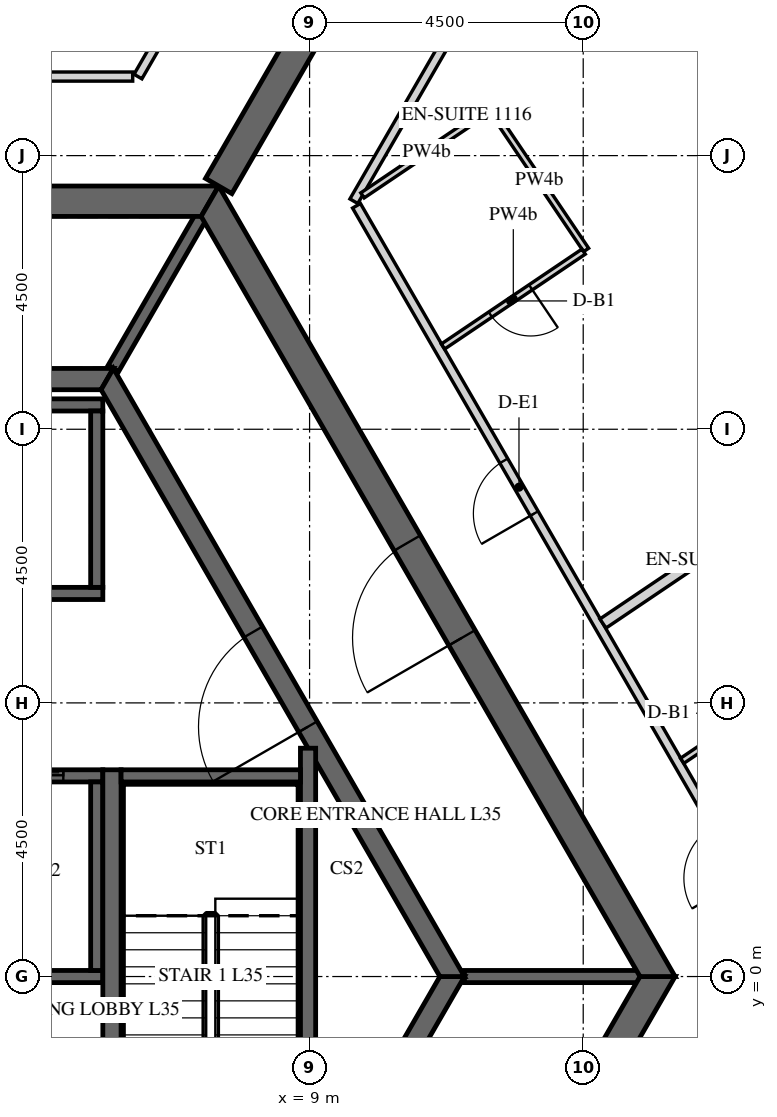
"""IFC4 building model, lengths in metres.
Left out: names, types, materials, properties, quantities, classifications, styles, units other than length and angle.
Written with IfcOpenShell. Run it as: python <this file> out.ifc"""

import sys

from ifc_helpers import new_model, si_unit, direction, frame, frame_2d, origin, place, context, subcontext, project, spatial, polyline, rectangle, outline, extrude, element, fill, save


model = new_model("IFC4")
c1 = context("Model", 3, precision=1e-05, world=origin(), true_north=direction((0.0, 1.0)))
c2 = subcontext(c1, "Body", "Model", "MODEL_VIEW")
j1 = project(units=[si_unit("LENGTHUNIT", "METRE"), si_unit("PLANEANGLEUNIT", "RADIAN")], contexts=[c1])
p1 = place(None, origin())
s1 = spatial("IfcSite", under=j1, at=p1, CompositionType="ELEMENT")
p2 = place(p1, origin())
s2 = spatial("IfcBuilding", under=s1, at=p2, CompositionType="ELEMENT")
p3 = place(p2, frame((0.0, 0.0, 152.7)))
s3 = spatial("IfcBuildingStorey", under=s2, at=p3, CompositionType="ELEMENT", Elevation=152.7)
p4 = place(p3, frame((7.361, -12.75, 0.0), z_axis=(0.0, 0.0, 1.0), x_axis=(0.50000571537, 0.866022103989, 0.0)))
e1 = element("IfcWall", 1, at=p4, inside=s3, PredefinedType="SHEAR", context=c2, shape_type="SweptSolid", body=[
    extrude(outline(polyline([(-0.144, -0.25), (14.867, -0.25), (14.578, 0.25), (0.144, 0.25), (-0.144, -0.25)])), origin(), (0.0, 0.0, 1.0), 3.75),
])
p5 = place(p4, frame((6.49, 0.0, 0.0)))
e2 = element("IfcOpeningElement", 2, at=p5, cuts=e1, PredefinedType="OPENING", context=c2, shape_type="SweptSolid", body=[
    extrude(rectangle(XDim=1.8, YDim=2.4, at=frame_2d((0.9, 1.2))), frame((0.0, 0.26, 0.0), z_axis=(0.0, -1.0, 0.0), x_axis=(1.0, 0.0, 0.0)), (0.0, 0.0, 1.0), 0.52),
])
p6 = place(p3, frame((14.722, 0.0, 0.0), z_axis=(0.0, 0.0, 1.0), x_axis=(-0.50000571537, 0.866022103989, 0.0)))
e3 = element("IfcWall", 3, at=p6, inside=s3, PredefinedType="SHEAR", context=c2, shape_type="SweptSolid", body=[
    extrude(outline(polyline([(-0.144, -0.25), (14.867, -0.25), (14.578, 0.25), (0.144, 0.25), (-0.144, -0.25)])), origin(), (0.0, 0.0, 1.0), 3.75),
])
p7 = place(p6, frame((6.432, 0.0, 0.0)))
e4 = element("IfcOpeningElement", 4, at=p7, cuts=e3, PredefinedType="OPENING", context=c2, shape_type="SweptSolid", body=[
    extrude(rectangle(XDim=1.8, YDim=2.4, at=frame_2d((0.9, 1.2))), frame((0.0, 0.26, 0.0), z_axis=(0.0, -1.0, 0.0), x_axis=(1.0, 0.0, 0.0)), (0.0, 0.0, 1.0), 0.52),
])
p8 = place(p3, frame((7.361, 12.75, 0.0), z_axis=(0.0, 0.0, 1.0), x_axis=(-1.0, 0.0, 0.0)))
e5 = element("IfcWall", 5, at=p8, inside=s3, PredefinedType="SHEAR", context=c2, shape_type="SweptSolid", body=[
    extrude(outline(polyline([(-0.144, -0.25), (14.866, -0.25), (14.578, 0.25), (0.144, 0.25), (-0.144, -0.25)])), origin(), (0.0, 0.0, 1.0), 3.75),
])
p9 = place(p8, frame((6.761, 0.0, 0.0)))
e6 = element("IfcOpeningElement", 6, at=p9, cuts=e5, PredefinedType="OPENING", context=c2, shape_type="SweptSolid", body=[
    extrude(rectangle(XDim=1.2, YDim=2.4, at=frame_2d((0.6, 1.2))), frame((0.0, 0.26, 0.0), z_axis=(0.0, -1.0, 0.0), x_axis=(1.0, 0.0, 0.0)), (0.0, 0.0, 1.0), 0.52),
])
p10 = place(p3, frame((7.506, 13.0, 0.0), z_axis=(0.0, 0.0, 1.0), x_axis=(0.499988271576, 0.866032175087, 0.0)))
e7 = element("IfcWall", 7, at=p10, inside=s3, PredefinedType="SHEAR", context=c2, shape_type="SweptSolid", body=[
    extrude(rectangle(XDim=15.424, YDim=0.5, at=frame_2d((7.712, 0.0))), origin(), (0.0, 0.0, 1.0), 3.75),
])
p11 = place(p10, frame((6.812, 0.0, 0.0)))
e8 = element("IfcOpeningElement", 8, at=p11, cuts=e7, PredefinedType="OPENING", context=c2, shape_type="SweptSolid", body=[
    extrude(rectangle(XDim=1.8, YDim=2.4, at=frame_2d((0.9, 1.2))), frame((0.0, 0.26, 0.0), z_axis=(0.0, -1.0, 0.0), x_axis=(1.0, 0.0, 0.0)), (0.0, 0.0, 1.0), 0.52),
])
p12 = place(p3, frame((5.673, -9.825, 0.0), z_axis=(0.0, 0.0, 1.0), x_axis=(0.499995046907, 0.866028263435, 0.0)))
e9 = element("IfcWall", 9, at=p12, inside=s3, PredefinedType="SHEAR", context=c2, shape_type="SweptSolid", body=[
    extrude(outline(polyline([(-0.101, -0.175), (11.446, -0.175), (11.244, 0.175), (0.101, 0.175), (-0.101, -0.175)])), origin(), (0.0, 0.0, 1.0), 3.75),
])
p13 = place(p12, frame((4.801, 0.0, 0.0)))
e10 = element("IfcOpeningElement", 10, at=p13, cuts=e9, PredefinedType="OPENING", context=c2, shape_type="SweptSolid", body=[
    extrude(rectangle(XDim=1.8, YDim=2.4, at=frame_2d((0.9, 1.2))), frame((0.0, 0.185, 0.0), z_axis=(0.0, -1.0, 0.0), x_axis=(1.0, 0.0, 0.0)), (0.0, 0.0, 1.0), 0.37),
])
p14 = place(p3, frame((11.345, 0.0, 0.0), z_axis=(0.0, 0.0, 1.0), x_axis=(-0.499995046907, 0.866028263435, 0.0)))
e11 = element("IfcWall", 11, at=p14, inside=s3, PredefinedType="SHEAR", context=c2, shape_type="SweptSolid", body=[
    extrude(outline(polyline([(-0.101, -0.175), (11.446, -0.175), (11.244, 0.175), (0.101, 0.175), (-0.101, -0.175)])), origin(), (0.0, 0.0, 1.0), 3.75),
])
p15 = place(p14, frame((4.744, 0.0, 0.0)))
e12 = element("IfcOpeningElement", 12, at=p15, cuts=e11, PredefinedType="OPENING", context=c2, shape_type="SweptSolid", body=[
    extrude(rectangle(XDim=1.8, YDim=2.4, at=frame_2d((0.9, 1.2))), frame((0.0, 0.185, 0.0), z_axis=(0.0, -1.0, 0.0), x_axis=(1.0, 0.0, 0.0)), (0.0, 0.0, 1.0), 0.37),
])
p16 = place(p3, frame((5.673, 9.825, 0.0), z_axis=(0.0, 0.0, 1.0), x_axis=(-1.0, 0.0, 0.0)))
e13 = element("IfcWall", 13, at=p16, inside=s3, PredefinedType="SHEAR", context=c2, shape_type="SweptSolid", body=[
    extrude(outline(polyline([(-0.101, -0.175), (11.446, -0.175), (11.244, 0.175), (0.101, 0.175), (-0.101, -0.175)])), origin(), (0.0, 0.0, 1.0), 3.75),
])
p17 = place(p3, frame((-5.6, 6.3, -0.5), z_axis=(0.0, 0.0, 1.0), x_axis=(1.0, 0.0, 0.0)))
e14 = element("IfcWall", 14, at=p17, inside=s3, PredefinedType="SHEAR", context=c2, shape_type="SweptSolid", body=[
    extrude(rectangle(XDim=11.2, YDim=0.2, at=frame_2d((5.6, 0.0))), origin(), (0.0, 0.0, 1.0), 4.15),
])
p18 = place(p17, frame((8.45, 0.0, 0.5)))
e15 = element("IfcOpeningElement", 15, at=p18, cuts=e14, PredefinedType="OPENING", context=c2, shape_type="SweptSolid", body=[
    extrude(rectangle(XDim=0.9, YDim=2.1, at=frame_2d((0.45, 1.05))), frame((0.0, 0.11, 0.0), z_axis=(0.0, -1.0, 0.0), x_axis=(1.0, 0.0, 0.0)), (0.0, 0.0, 1.0), 0.22),
])
p19 = place(p17, frame((0.65, 0.0, 0.5)))
e16 = element("IfcOpeningElement", 16, at=p19, cuts=e14, PredefinedType="OPENING", context=c2, shape_type="SweptSolid", body=[
    extrude(rectangle(XDim=1.1, YDim=2.1, at=frame_2d((0.55, 1.05))), frame((0.0, 0.11, 0.0), z_axis=(0.0, -1.0, 0.0), x_axis=(1.0, 0.0, 0.0)), (0.0, 0.0, 1.0), 0.22),
])
p20 = place(p17, frame((2.85, 0.0, 0.5)))
e17 = element("IfcOpeningElement", 17, at=p20, cuts=e14, PredefinedType="OPENING", context=c2, shape_type="SweptSolid", body=[
    extrude(rectangle(XDim=1.1, YDim=2.1, at=frame_2d((0.55, 1.05))), frame((0.0, 0.11, 0.0), z_axis=(0.0, -1.0, 0.0), x_axis=(1.0, 0.0, 0.0)), (0.0, 0.0, 1.0), 0.22),
])
p21 = place(p17, frame((5.05, 0.0, 0.5)))
e18 = element("IfcOpeningElement", 18, at=p21, cuts=e14, PredefinedType="OPENING", context=c2, shape_type="SweptSolid", body=[
    extrude(rectangle(XDim=1.1, YDim=2.1, at=frame_2d((0.55, 1.05))), frame((0.0, 0.11, 0.0), z_axis=(0.0, -1.0, 0.0), x_axis=(1.0, 0.0, 0.0)), (0.0, 0.0, 1.0), 0.22),
])
p22 = place(p3, frame((-5.6, 9.4, -0.5), z_axis=(0.0, 0.0, 1.0), x_axis=(1.0, 0.0, 0.0)))
e19 = element("IfcWall", 19, at=p22, inside=s3, PredefinedType="SHEAR", context=c2, shape_type="SweptSolid", body=[
    extrude(rectangle(XDim=11.2, YDim=0.2, at=frame_2d((5.6, 0.0))), origin(), (0.0, 0.0, 1.0), 4.15),
])
p23 = place(p3, frame((5.5, 6.4, -0.5), z_axis=(0.0, 0.0, 1.0), x_axis=(0.0, 1.0, 0.0)))
e20 = element("IfcWall", 20, at=p23, inside=s3, PredefinedType="SHEAR", context=c2, shape_type="SweptSolid", body=[
    extrude(rectangle(XDim=2.9, YDim=0.2, at=frame_2d((1.45, 0.0))), origin(), (0.0, 0.0, 1.0), 4.15),
])
p24 = place(p3, frame((-5.6, 3.3, -0.5), z_axis=(0.0, 0.0, 1.0), x_axis=(1.0, 0.0, 0.0)))
e21 = element("IfcWall", 21, at=p24, inside=s3, PredefinedType="SHEAR", context=c2, shape_type="SweptSolid", body=[
    extrude(rectangle(XDim=11.2, YDim=0.2, at=frame_2d((5.6, 0.0))), origin(), (0.0, 0.0, 1.0), 4.15),
])
p25 = place(p24, frame((0.65, 0.0, 0.5)))
e22 = element("IfcOpeningElement", 22, at=p25, cuts=e21, PredefinedType="OPENING", context=c2, shape_type="SweptSolid", body=[
    extrude(rectangle(XDim=1.1, YDim=2.1, at=frame_2d((0.55, 1.05))), frame((0.0, 0.11, 0.0), z_axis=(0.0, -1.0, 0.0), x_axis=(1.0, 0.0, 0.0)), (0.0, 0.0, 1.0), 0.22),
])
p26 = place(p24, frame((2.85, 0.0, 0.5)))
e23 = element("IfcOpeningElement", 23, at=p26, cuts=e21, PredefinedType="OPENING", context=c2, shape_type="SweptSolid", body=[
    extrude(rectangle(XDim=1.1, YDim=2.1, at=frame_2d((0.55, 1.05))), frame((0.0, 0.11, 0.0), z_axis=(0.0, -1.0, 0.0), x_axis=(1.0, 0.0, 0.0)), (0.0, 0.0, 1.0), 0.22),
])
p27 = place(p24, frame((5.05, 0.0, 0.5)))
e24 = element("IfcOpeningElement", 24, at=p27, cuts=e21, PredefinedType="OPENING", context=c2, shape_type="SweptSolid", body=[
    extrude(rectangle(XDim=1.1, YDim=2.1, at=frame_2d((0.55, 1.05))), frame((0.0, 0.11, 0.0), z_axis=(0.0, -1.0, 0.0), x_axis=(1.0, 0.0, 0.0)), (0.0, 0.0, 1.0), 0.22),
])
p28 = place(p24, frame((7.25, 0.0, 0.5)))
e25 = element("IfcOpeningElement", 25, at=p28, cuts=e21, PredefinedType="OPENING", context=c2, shape_type="SweptSolid", body=[
    extrude(rectangle(XDim=1.1, YDim=2.1, at=frame_2d((0.55, 1.05))), frame((0.0, 0.11, 0.0), z_axis=(0.0, -1.0, 0.0), x_axis=(1.0, 0.0, 0.0)), (0.0, 0.0, 1.0), 0.22),
])
p29 = place(p24, frame((9.45, 0.0, 0.5)))
e26 = element("IfcOpeningElement", 26, at=p29, cuts=e21, PredefinedType="OPENING", context=c2, shape_type="SweptSolid", body=[
    extrude(rectangle(XDim=1.1, YDim=2.1, at=frame_2d((0.55, 1.05))), frame((0.0, 0.11, 0.0), z_axis=(0.0, -1.0, 0.0), x_axis=(1.0, 0.0, 0.0)), (0.0, 0.0, 1.0), 0.22),
])
p30 = place(p3, frame((-5.6, 0.0, -0.5), z_axis=(0.0, 0.0, 1.0), x_axis=(1.0, 0.0, 0.0)))
e27 = element("IfcWall", 27, at=p30, inside=s3, PredefinedType="SHEAR", context=c2, shape_type="SweptSolid", body=[
    extrude(rectangle(XDim=11.2, YDim=0.2, at=frame_2d((5.6, 0.0))), origin(), (0.0, 0.0, 1.0), 4.15),
])
p31 = place(p3, frame((5.5, 0.1, -0.5), z_axis=(0.0, 0.0, 1.0), x_axis=(0.0, 1.0, 0.0)))
e28 = element("IfcWall", 28, at=p31, inside=s3, PredefinedType="SHEAR", context=c2, shape_type="SweptSolid", body=[
    extrude(rectangle(XDim=3.1, YDim=0.2, at=frame_2d((1.55, 0.0))), origin(), (0.0, 0.0, 1.0), 4.15),
])
for number, where, z_axis, x_axis in (
    (29, (11.547, 0.0, 0.0), (0.0, 0.0, 1.0), (1.0, 0.0, 0.0)),
    (30, (5.773, 10.0, 0.0), (0.0, 0.0, 1.0), (0.5, 0.866, 0.0)),
):
    element("IfcWall", number, at=place(p3, frame(where, z_axis=z_axis, x_axis=x_axis)), inside=s3, PredefinedType="SHEAR", context=c2, shape_type="SweptSolid", body=[
        extrude(rectangle(XDim=2.887, YDim=0.2, at=frame_2d((1.443, 0.0))), origin(), (0.0, 0.0, 1.0), 3.75),
    ])
p32 = place(p3, frame((5.75, -3.4, -0.5), z_axis=(0.0, 0.0, 1.0), x_axis=(0.0, 1.0, 0.0)))
e31 = element("IfcWall", 31, at=p32, inside=s3, PredefinedType="SHEAR", context=c2, shape_type="SweptSolid", body=[
    extrude(rectangle(XDim=6.8, YDim=0.3, at=frame_2d((3.4, 0.0))), origin(), (0.0, 0.0, 1.0), 4.15),
])
p33 = place(p3, frame((8.975, -3.755, -0.5), z_axis=(0.0, 0.0, 1.0), x_axis=(0.0, 1.0, 0.0)))
e32 = element("IfcWall", 32, at=p33, inside=s3, PredefinedType="SHEAR", context=c2, shape_type="SweptSolid", body=[
    extrude(rectangle(XDim=7.51, YDim=0.25, at=frame_2d((3.755, 0.0))), origin(), (0.0, 0.0, 1.0), 4.15),
])
p34 = place(p3, frame((5.9, 3.3, -0.5), z_axis=(0.0, 0.0, 1.0), x_axis=(1.0, 0.0, 0.0)))
e33 = element("IfcWall", 33, at=p34, inside=s3, PredefinedType="SHEAR", context=c2, shape_type="SweptSolid", body=[
    extrude(rectangle(XDim=2.95, YDim=0.2, at=frame_2d((1.475, 0.0))), origin(), (0.0, 0.0, 1.0), 4.15),
])
p35 = place(p3, frame((10.149, 21.678, 0.0), z_axis=(0.0, 0.0, 1.0), x_axis=(-0.499997422768, -0.866026891745, 0.0)))
e34 = element("IfcWall", 34, at=p35, inside=s3, PredefinedType="PARTITIONING", context=c2, shape_type="SweptSolid", body=[
    extrude(rectangle(XDim=7.942, YDim=0.15, at=frame_2d((3.971, 0.0))), origin(), (0.0, 0.0, 1.0), 2.823),
])
p36 = place(p35, frame((4.833, 0.0, 0.0)))
e35 = element("IfcOpeningElement", 35, at=p36, cuts=e34, PredefinedType="OPENING", context=c2, shape_type="SweptSolid", body=[
    extrude(rectangle(XDim=1.0, YDim=2.1, at=frame_2d((0.5, 1.05))), frame((0.0, 0.085, 0.0), z_axis=(0.0, -1.0, 0.0), x_axis=(1.0, 0.0, 0.0)), (0.0, 0.0, 1.0), 0.17),
])
p37 = place(p3, frame((6.091, 14.8, 0.0), z_axis=(0.0, 0.0, 1.0), x_axis=(-1.0, 0.0, 0.0)))
e36 = element("IfcWall", 36, at=p37, inside=s3, PredefinedType="PARTITIONING", context=c2, shape_type="SweptSolid", body=[
    extrude(rectangle(XDim=14.636, YDim=0.15, at=frame_2d((7.318, 0.0))), origin(), (0.0, 0.0, 1.0), 2.823),
])
p38 = place(p37, frame((7.909, 0.0, 0.0)))
e37 = element("IfcOpeningElement", 37, at=p38, cuts=e36, PredefinedType="OPENING", context=c2, shape_type="SweptSolid", body=[
    extrude(rectangle(XDim=1.0, YDim=2.1, at=frame_2d((0.5, 1.05))), frame((0.0, 0.085, 0.0), z_axis=(0.0, -1.0, 0.0), x_axis=(1.0, 0.0, 0.0)), (0.0, 0.0, 1.0), 0.17),
])
p39 = place(p3, frame((10.714, -11.043, 0.0), z_axis=(0.0, 0.0, 1.0), x_axis=(0.500001980452, 0.866024260367, 0.0)))
e38 = element("IfcWall", 38, at=p39, inside=s3, PredefinedType="PARTITIONING", context=c2, shape_type="SweptSolid", body=[
    extrude(rectangle(XDim=12.752, YDim=0.15, at=frame_2d((6.376, 0.0))), origin(), (0.0, 0.0, 1.0), 2.823),
])
p40 = place(p39, frame((3.625, 0.0, 0.0)))
e39 = element("IfcOpeningElement", 39, at=p40, cuts=e38, PredefinedType="OPENING", context=c2, shape_type="SweptSolid", body=[
    extrude(rectangle(XDim=1.0, YDim=2.1, at=frame_2d((0.5, 1.05))), frame((0.0, 0.085, 0.0), z_axis=(0.0, -1.0, 0.0), x_axis=(1.0, 0.0, 0.0)), (0.0, 0.0, 1.0), 0.17),
])
p41 = place(p39, frame((11.602, 0.0, 0.0)))
e40 = element("IfcOpeningElement", 40, at=p41, cuts=e38, PredefinedType="OPENING", context=c2, shape_type="SweptSolid", body=[
    extrude(rectangle(XDim=1.0, YDim=2.1, at=frame_2d((0.5, 1.05))), frame((0.0, 0.085, 0.0), z_axis=(0.0, -1.0, 0.0), x_axis=(1.0, 0.0, 0.0)), (0.0, 0.0, 1.0), 0.17),
])
p42 = place(p3, frame((17.046, 0.075, 0.0), z_axis=(0.0, 0.0, 1.0), x_axis=(-0.499999403554, 0.866025748143, 0.0)))
e41 = element("IfcWall", 41, at=p42, inside=s3, PredefinedType="PARTITIONING", context=c2, shape_type="SweptSolid", body=[
    extrude(rectangle(XDim=14.549, YDim=0.15, at=frame_2d((7.275, 0.0))), origin(), (0.0, 0.0, 1.0), 2.823),
])
p43 = place(p42, frame((1.781, 0.0, 0.0)))
e42 = element("IfcOpeningElement", 42, at=p43, cuts=e41, PredefinedType="OPENING", context=c2, shape_type="SweptSolid", body=[
    extrude(rectangle(XDim=1.0, YDim=2.1, at=frame_2d((0.5, 1.05))), frame((0.0, 0.085, 0.0), z_axis=(0.0, -1.0, 0.0), x_axis=(1.0, 0.0, 0.0)), (0.0, 0.0, 1.0), 0.17),
])
p44 = place(p42, frame((8.705, 0.0, 0.0)))
e43 = element("IfcOpeningElement", 43, at=p44, cuts=e41, PredefinedType="OPENING", context=c2, shape_type="SweptSolid", body=[
    extrude(rectangle(XDim=1.0, YDim=2.1, at=frame_2d((0.5, 1.05))), frame((0.0, 0.085, 0.0), z_axis=(0.0, -1.0, 0.0), x_axis=(1.0, 0.0, 0.0)), (0.0, 0.0, 1.0), 0.17),
])
p45 = place(p3, frame((9.728, 12.75, 0.0), z_axis=(0.0, 0.0, 1.0), x_axis=(0.500007149838, 0.866021275784, 0.0)))
e44 = element("IfcWall", 44, at=p45, inside=s3, PredefinedType="PARTITIONING", context=c2, shape_type="SweptSolid", body=[
    extrude(rectangle(XDim=8.017, YDim=0.15, at=frame_2d((4.009, 0.0))), origin(), (0.0, 0.0, 1.0), 2.823),
])
p46 = place(p3, frame((17.53, 5.168, 0.0), z_axis=(0.0, 0.0, 1.0), x_axis=(-0.829031257997, -0.559202265073, 0.0)))
e45 = element("IfcWall", 45, at=p46, inside=s3, PredefinedType="PARTITIONING", context=c2, shape_type="SweptSolid", body=[
    extrude(rectangle(XDim=2.898, YDim=0.1, at=frame_2d((1.449, 0.0))), origin(), (0.0, 0.0, 1.0), 2.823),
])
p47 = place(p46, frame((1.1, 0.0, 0.0)))
e46 = element("IfcOpeningElement", 46, at=p47, cuts=e45, PredefinedType="OPENING", context=c2, shape_type="SweptSolid", body=[
    extrude(rectangle(XDim=0.8, YDim=2.1, at=frame_2d((0.4, 1.05))), frame((0.0, 0.06, 0.0), z_axis=(0.0, -1.0, 0.0), x_axis=(1.0, 0.0, 0.0)), (0.0, 0.0, 1.0), 0.12),
])
p48 = place(p3, frame((24.389, 12.931, 0.0), z_axis=(0.0, 0.0, 1.0), x_axis=(-0.829049407957, -0.559175356365, 0.0)))
e47 = element("IfcWall", 47, at=p48, inside=s3, PredefinedType="PARTITIONING", context=c2, shape_type="SweptSolid", body=[
    extrude(rectangle(XDim=12.743, YDim=0.18, at=frame_2d((6.372, 0.0))), origin(), (0.0, 0.0, 1.0), 2.823),
])
p49 = place(p3, frame((9.87, 12.846, 0.0), z_axis=(0.0, 0.0, 1.0), x_axis=(0.829045266323, 0.559181496821, 0.0)))
e48 = element("IfcWall", 48, at=p49, inside=s3, PredefinedType="PARTITIONING", context=c2, shape_type="SweptSolid", body=[
    extrude(rectangle(XDim=2.548, YDim=0.1, at=frame_2d((1.274, 0.0))), origin(), (0.0, 0.0, 1.0), 2.823),
])
p50 = place(p3, frame((12.01, 14.229, 0.0), z_axis=(0.0, 0.0, 1.0), x_axis=(0.559158698756, -0.8290606429, 0.0)))
e49 = element("IfcWall", 49, at=p50, inside=s3, PredefinedType="PARTITIONING", context=c2, shape_type="SweptSolid", body=[
    extrude(rectangle(XDim=2.75, YDim=0.1, at=frame_2d((1.375, 0.0))), origin(), (0.0, 0.0, 1.0), 2.823),
])
p51 = place(p3, frame((13.506, 11.921, 0.0), z_axis=(0.0, 0.0, 1.0), x_axis=(-0.829048535811, -0.559176649431, 0.0)))
e50 = element("IfcWall", 50, at=p51, inside=s3, PredefinedType="PARTITIONING", context=c2, shape_type="SweptSolid", body=[
    extrude(rectangle(XDim=2.789, YDim=0.1, at=frame_2d((1.395, 0.0))), origin(), (0.0, 0.0, 1.0), 2.823),
])
p52 = place(p51, frame((1.05, 0.0, 0.0)))
e51 = element("IfcOpeningElement", 51, at=p52, cuts=e50, PredefinedType="OPENING", context=c2, shape_type="SweptSolid", body=[
    extrude(rectangle(XDim=0.8, YDim=2.1, at=frame_2d((0.4, 1.05))), frame((0.0, 0.06, 0.0), z_axis=(0.0, -1.0, 0.0), x_axis=(1.0, 0.0, 0.0)), (0.0, 0.0, 1.0), 0.12),
])
p53 = place(p7, origin())
e52 = element("IfcDoor", 52, at=p53, inside=s3, OperationType="DOUBLE_DOOR_SINGLE_SWING", PredefinedType="DOOR", context=c2, shape_type="SweptSolid", body=[
    extrude(rectangle(XDim=1.8, YDim=2.4, at=frame_2d((0.9, 1.2))), frame((0.0, 0.025, 0.0), z_axis=(0.0, -1.0, 0.0), x_axis=(1.0, 0.0, 0.0)), (0.0, 0.0, 1.0), 0.05),
])
fill(e4, e52)
p54 = place(p15, origin())
e53 = element("IfcDoor", 53, at=p54, inside=s3, OperationType="DOUBLE_DOOR_SINGLE_SWING", PredefinedType="DOOR", context=c2, shape_type="SweptSolid", body=[
    extrude(rectangle(XDim=1.8, YDim=2.4, at=frame_2d((0.9, 1.2))), frame((0.0, 0.025, 0.0), z_axis=(0.0, -1.0, 0.0), x_axis=(1.0, 0.0, 0.0)), (0.0, 0.0, 1.0), 0.05),
])
fill(e12, e53)
p55 = place(p29, origin())
e54 = element("IfcDoor", 54, at=p55, inside=s3, OperationType="SLIDING_TO_LEFT", PredefinedType="DOOR", context=c2, shape_type="SweptSolid", body=[
    extrude(rectangle(XDim=1.1, YDim=2.1, at=frame_2d((0.55, 1.05))), frame((0.0, 0.025, 0.0), z_axis=(0.0, -1.0, 0.0), x_axis=(1.0, 0.0, 0.0)), (0.0, 0.0, 1.0), 0.05),
])
fill(e26, e54)
p56 = place(p44, origin())
e55 = element("IfcDoor", 55, at=p56, inside=s3, OperationType="SINGLE_SWING_RIGHT", PredefinedType="DOOR", context=c2, shape_type="SweptSolid", body=[
    extrude(rectangle(XDim=1.0, YDim=2.1, at=frame_2d((0.5, 1.05))), frame((0.0, 0.025, 0.0), z_axis=(0.0, -1.0, 0.0), x_axis=(1.0, 0.0, 0.0)), (0.0, 0.0, 1.0), 0.05),
])
fill(e43, e55)
p57 = place(p52, origin())
e56 = element("IfcDoor", 56, at=p57, inside=s3, OperationType="SINGLE_SWING_LEFT", PredefinedType="DOOR", context=c2, shape_type="SweptSolid", body=[
    extrude(rectangle(XDim=0.8, YDim=2.1, at=frame_2d((0.4, 1.05))), frame((0.0, 0.025, 0.0), z_axis=(0.0, -1.0, 0.0), x_axis=(1.0, 0.0, 0.0)), (0.0, 0.0, 1.0), 0.05),
])
fill(e51, e56)
save(model, sys.argv[1])
